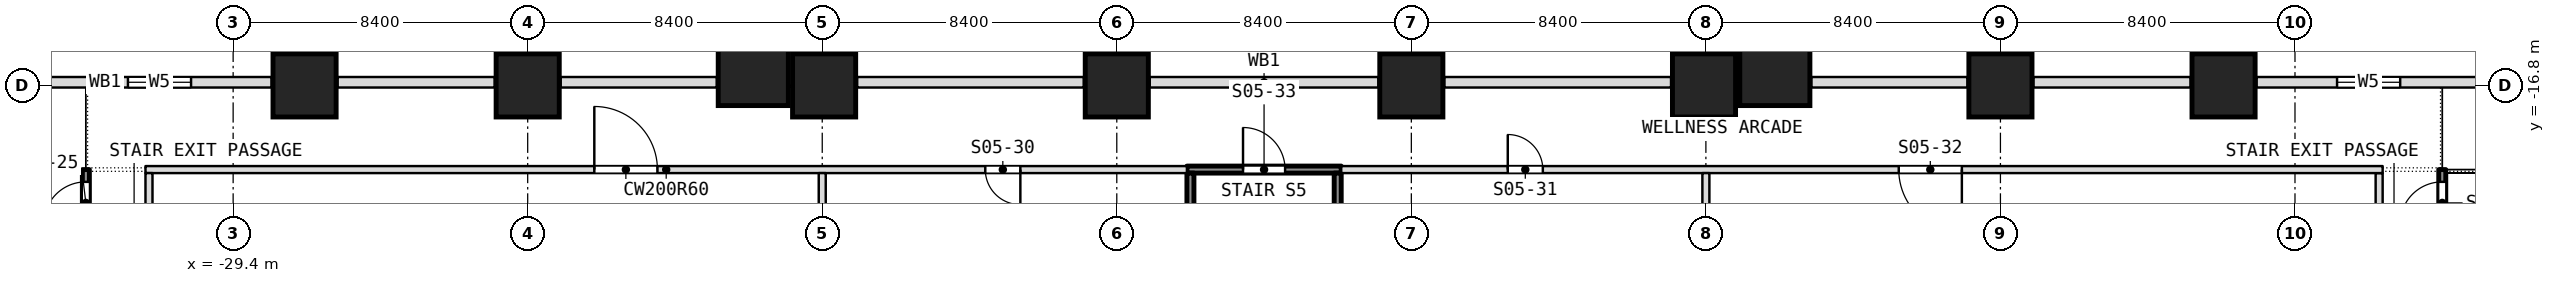
"""IFC4 building model, lengths in metres.
Left out: names, types, materials, properties, quantities, classifications, styles, units other than length and angle.
Written with IfcOpenShell. Run it as: python <this file> out.ifc"""

import sys

from ifc_helpers import new_model, si_unit, direction, frame, frame_2d, origin, origin_2d, place, context, subcontext, project, spatial, polyline, rectangle, outline, extrude, element, fill, save


model = new_model("IFC4")
c1 = context("Model", 3, precision=1e-05, world=origin(), true_north=direction((0.0, 1.0)))
c2 = subcontext(c1, "Body", "Model", "MODEL_VIEW")
j1 = project(units=[si_unit("LENGTHUNIT", "METRE"), si_unit("PLANEANGLEUNIT", "RADIAN")], contexts=[c1])
p1 = place(None, origin())
s1 = spatial("IfcSite", under=j1, at=p1, CompositionType="ELEMENT")
p2 = place(p1, origin())
s2 = spatial("IfcBuilding", under=s1, at=p2, CompositionType="ELEMENT")
p3 = place(p2, frame((0.0, 0.0, 26.0)))
s3 = spatial("IfcBuildingStorey", under=s2, at=p3, CompositionType="ELEMENT", Elevation=26.0)
for number, where, z_axis, x_axis in (
    (1, (-21.0, -16.8, 0.0), (0.0, 0.0, 1.0), (1.0, 0.0, 0.0)),
    (2, (-12.546, -16.8, 0.0), (0.0, 0.0, 1.0), (1.0, 0.0, 0.0)),
    (3, (-4.2, -16.8, 0.0), (0.0, 0.0, 1.0), (1.0, 0.0, 0.0)),
    (4, (4.2, -16.8, 0.0), (0.0, 0.0, 1.0), (1.0, 0.0, 0.0)),
    (5, (12.546, -16.8, 0.0), (0.0, 0.0, 1.0), (1.0, 0.0, 0.0)),
    (6, (21.0, -16.8, 0.0), (0.0, 0.0, 1.0), (1.0, 0.0, 0.0)),
    (7, (-27.363, -16.8, 0.0), (0.0, 0.0, 1.0), (1.0, 0.0, 0.0)),
    (8, (27.363, -16.8, 0.0), (0.0, 0.0, 1.0), (1.0, 0.0, 0.0)),
):
    element("IfcColumn", number, at=place(p3, frame(where, z_axis=z_axis, x_axis=x_axis)), inside=s3, PredefinedType="COLUMN", context=c2, shape_type="SweptSolid", body=[
        extrude(rectangle(XDim=1.8, YDim=1.8, at=origin_2d()), origin(), (0.0, 0.0, 1.0), 5.0),
    ])
for number, where, z_axis, x_axis in (
    (9, (-14.566, -16.375, 0.0), (0.0, 0.0, 1.0), (1.0, 0.0, 0.0)),
    (10, (14.566, -16.375, 0.0), (0.0, 0.0, 1.0), (1.0, 0.0, 0.0)),
):
    element("IfcColumn", number, at=place(p3, frame(where, z_axis=z_axis, x_axis=x_axis)), inside=s3, PredefinedType="COLUMN", context=c2, shape_type="SweptSolid", body=[
        extrude(rectangle(XDim=2.0, YDim=2.0, at=origin_2d()), origin(), (0.0, 0.0, 1.0), 5.0),
    ])
p4 = place(p3, frame((37.8, 2.4, 0.0), z_axis=(1.0, 0.0, 0.0), x_axis=(0.0, 0.0, 1.0)))
e11 = element("IfcWall", 11, at=p4, inside=s3, PredefinedType="SOLIDWALL", context=c2, shape_type="SweptSolid", body=[
    extrude(outline(polyline([(0.0, 0.0), (4.68, 0.0), (4.68, 21.6), (0.0, 21.6), (0.0, 16.321), (0.541, 15.6), (1.199, 14.4), (1.65, 13.2), (1.913, 12.0), (2.0, 10.8), (1.913, 9.6), (1.65, 8.4), (1.199, 7.2), (0.541, 6.0), (0.0, 5.279), (0.0, 0.0)])), origin(), (0.0, 0.0, -1.0), 4.2),
])
p5 = place(p3, frame((-37.8, 2.4, 0.0), z_axis=(-1.0, 0.0, 0.0), x_axis=(0.0, -1.0, 0.0)))
e12 = element("IfcWall", 12, at=p5, inside=s3, PredefinedType="SOLIDWALL", context=c2, shape_type="SweptSolid", body=[
    extrude(outline(polyline([(0.0, 0.0), (5.279, 0.0), (6.0, 0.541), (7.2, 1.199), (8.4, 1.65), (9.6, 1.913), (10.8, 2.0), (12.0, 1.913), (13.2, 1.65), (14.4, 1.199), (15.6, 0.541), (16.321, 0.0), (21.6, 0.0), (21.6, 4.68), (0.0, 4.68), (0.0, 0.0)])), origin(), (0.0, 0.0, -1.0), 4.2),
])
p6 = place(p3, frame((33.6, -22.3, 0.0), z_axis=(0.0, 0.0, 1.0), x_axis=(0.0, 1.0, 0.0)))
e13 = element("IfcWall", 13, at=p6, inside=s3, PredefinedType="PARTITIONING", context=c2, shape_type="SweptSolid", body=[
    extrude(rectangle(XDim=3.1, YDim=0.2, at=frame_2d((1.55, 0.0))), origin(), (0.0, 0.0, 1.0), 4.68),
])
p7 = place(p6, frame((1.55, 0.0, 0.0)))
e14 = element("IfcOpeningElement", 14, at=p7, cuts=e13, PredefinedType="OPENING", context=c2, shape_type="SweptSolid", body=[
    extrude(rectangle(XDim=1.2, YDim=2.1, at=frame_2d((0.6, 1.05))), frame((0.0, 0.1, 0.0), z_axis=(0.0, -1.0, 0.0), x_axis=(1.0, 0.0, 0.0)), (0.0, 0.0, 1.0), 0.2),
])
p8 = place(p3, frame((31.8, -22.1, 0.0), z_axis=(0.0, 0.0, 1.0), x_axis=(0.0, 1.0, 0.0)))
e15 = element("IfcWall", 15, at=p8, inside=s3, PredefinedType="PARTITIONING", context=c2, shape_type="SweptSolid", body=[
    extrude(rectangle(XDim=2.8, YDim=0.2, at=frame_2d((1.4, 0.0))), origin(), (0.0, 0.0, 1.0), 4.68),
])
p9 = place(p3, frame((-31.9, -19.2, 0.0), z_axis=(0.0, 0.0, 1.0), x_axis=(1.0, 0.0, 0.0)))
e16 = element("IfcWall", 16, at=p9, inside=s3, PredefinedType="PARTITIONING", context=c2, shape_type="SweptSolid", body=[
    extrude(rectangle(XDim=29.7, YDim=0.2, at=frame_2d((14.85, 0.0))), origin(), (0.0, 0.0, 1.0), 4.68),
])
p10 = place(p9, frame((12.8, 0.0, 0.0)))
e17 = element("IfcOpeningElement", 17, at=p10, cuts=e16, PredefinedType="OPENING", context=c2, shape_type="SweptSolid", body=[
    extrude(rectangle(XDim=1.8, YDim=2.1, at=frame_2d((0.9, 1.05))), frame((0.0, 0.1, 0.0), z_axis=(0.0, -1.0, 0.0), x_axis=(1.0, 0.0, 0.0)), (0.0, 0.0, 1.0), 0.2),
])
p11 = place(p9, frame((23.95, 0.0, 0.0)))
e18 = element("IfcOpeningElement", 18, at=p11, cuts=e16, PredefinedType="OPENING", context=c2, shape_type="SweptSolid", body=[
    extrude(rectangle(XDim=1.0, YDim=2.1, at=frame_2d((0.5, 1.05))), frame((0.0, 0.1, 0.0), z_axis=(0.0, -1.0, 0.0), x_axis=(1.0, 0.0, 0.0)), (0.0, 0.0, 1.0), 0.2),
])
p12 = place(p3, frame((2.2, -19.2, 0.0), z_axis=(0.0, 0.0, 1.0), x_axis=(1.0, 0.0, 0.0)))
e19 = element("IfcWall", 19, at=p12, inside=s3, PredefinedType="PARTITIONING", context=c2, shape_type="SweptSolid", body=[
    extrude(rectangle(XDim=29.7, YDim=0.2, at=frame_2d((14.85, 0.0))), origin(), (0.0, 0.0, 1.0), 4.68),
])
p13 = place(p12, frame((4.75, 0.0, 0.0)))
e20 = element("IfcOpeningElement", 20, at=p13, cuts=e19, PredefinedType="OPENING", context=c2, shape_type="SweptSolid", body=[
    extrude(rectangle(XDim=1.0, YDim=2.1, at=frame_2d((0.5, 1.05))), frame((0.0, 0.1, 0.0), z_axis=(0.0, -1.0, 0.0), x_axis=(1.0, 0.0, 0.0)), (0.0, 0.0, 1.0), 0.2),
])
p14 = place(p12, frame((15.9, 0.0, 0.0)))
e21 = element("IfcOpeningElement", 21, at=p14, cuts=e19, PredefinedType="OPENING", context=c2, shape_type="SweptSolid", body=[
    extrude(rectangle(XDim=1.8, YDim=2.1, at=frame_2d((0.9, 1.05))), frame((0.0, 0.1, 0.0), z_axis=(0.0, -1.0, 0.0), x_axis=(1.0, 0.0, 0.0)), (0.0, 0.0, 1.0), 0.2),
])
p15 = place(p3, frame((-2.2, -19.2, 0.0), z_axis=(0.0, 0.0, 1.0), x_axis=(1.0, 0.0, 0.0)))
e22 = element("IfcWall", 22, at=p15, inside=s3, PredefinedType="PARTITIONING", context=c2, shape_type="SweptSolid", body=[
    extrude(rectangle(XDim=4.4, YDim=0.2, at=frame_2d((2.2, 0.0))), origin(), (0.0, 0.0, 1.0), 4.68),
])
p16 = place(p15, frame((1.6, 0.0, 0.0)))
e23 = element("IfcOpeningElement", 23, at=p16, cuts=e22, PredefinedType="OPENING", context=c2, shape_type="SweptSolid", body=[
    extrude(rectangle(XDim=1.2, YDim=2.1, at=frame_2d((0.6, 1.05))), frame((0.0, 0.1, 0.0), z_axis=(0.0, -1.0, 0.0), x_axis=(1.0, 0.0, 0.0)), (0.0, 0.0, 1.0), 0.2),
])
p17 = place(p3, frame((12.6, -25.5, 0.0), z_axis=(0.0, 0.0, 1.0), x_axis=(0.0, 1.0, 0.0)))
e24 = element("IfcWall", 24, at=p17, inside=s3, PredefinedType="PARTITIONING", context=c2, shape_type="SweptSolid", body=[
    extrude(rectangle(XDim=6.2, YDim=0.2, at=frame_2d((3.1, 0.0))), origin(), (0.0, 0.0, 1.0), 4.68),
])
for number, where, z_axis, x_axis in (
    (25, (2.1, -25.14, 0.0), (0.0, 0.0, 1.0), (0.0, 1.0, 0.0)),
    (26, (-2.1, -25.14, 0.0), (0.0, 0.0, 1.0), (0.0, 1.0, 0.0)),
):
    element("IfcWall", number, at=place(p3, frame(where, z_axis=z_axis, x_axis=x_axis)), inside=s3, PredefinedType="PARTITIONING", context=c2, shape_type="SweptSolid", body=[
        extrude(rectangle(XDim=5.84, YDim=0.2, at=frame_2d((2.92, 0.0))), origin(), (0.0, 0.0, 1.0), 4.68),
    ])
p18 = place(p3, frame((-12.6, -25.5, 0.0), z_axis=(0.0, 0.0, 1.0), x_axis=(0.0, 1.0, 0.0)))
e27 = element("IfcWall", 27, at=p18, inside=s3, PredefinedType="PARTITIONING", context=c2, shape_type="SweptSolid", body=[
    extrude(rectangle(XDim=6.2, YDim=0.2, at=frame_2d((3.1, 0.0))), origin(), (0.0, 0.0, 1.0), 4.68),
])
p19 = place(p3, frame((-31.8, -22.1, 0.0), z_axis=(0.0, 0.0, 1.0), x_axis=(0.0, 1.0, 0.0)))
e28 = element("IfcWall", 28, at=p19, inside=s3, PredefinedType="PARTITIONING", context=c2, shape_type="SweptSolid", body=[
    extrude(rectangle(XDim=2.8, YDim=0.2, at=frame_2d((1.4, 0.0))), origin(), (0.0, 0.0, 1.0), 4.68),
])
p20 = place(p3, frame((-33.6, -22.3, 0.0), z_axis=(0.0, 0.0, 1.0), x_axis=(0.0, 1.0, 0.0)))
e29 = element("IfcWall", 29, at=p20, inside=s3, PredefinedType="PARTITIONING", context=c2, shape_type="SweptSolid", body=[
    extrude(rectangle(XDim=3.1, YDim=0.2, at=frame_2d((1.55, 0.0))), origin(), (0.0, 0.0, 1.0), 4.68),
])
p21 = place(p20, frame((1.55, 0.0, 0.0)))
e30 = element("IfcOpeningElement", 30, at=p21, cuts=e29, PredefinedType="OPENING", context=c2, shape_type="SweptSolid", body=[
    extrude(rectangle(XDim=1.2, YDim=2.1, at=frame_2d((0.6, 1.05))), frame((0.0, 0.1, 0.0), z_axis=(0.0, -1.0, 0.0), x_axis=(1.0, 0.0, 0.0)), (0.0, 0.0, 1.0), 0.2),
])
p22 = place(p3, frame((37.8, -16.71, 0.0), z_axis=(0.0, 0.0, 1.0), x_axis=(-1.0, 0.0, 0.0)))
e31 = element("IfcWall", 31, at=p22, inside=s3, PredefinedType="NOTDEFINED", context=c2, shape_type="SweptSolid", body=[
    extrude(rectangle(XDim=9.497, YDim=0.3, at=frame_2d((4.749, 0.0))), origin(), (0.0, 0.0, 1.0), 5.0),
])
p23 = place(p22, frame((5.4, 0.0, 1.2)))
e32 = element("IfcOpeningElement", 32, at=p23, cuts=e31, PredefinedType="OPENING", context=c2, shape_type="SweptSolid", body=[
    extrude(rectangle(XDim=1.8, YDim=2.4, at=frame_2d((0.9, 1.2))), frame((0.0, 0.15, 0.0), z_axis=(0.0, -1.0, 0.0), x_axis=(1.0, 0.0, 0.0)), (0.0, 0.0, 1.0), 0.3),
])
p24 = place(p3, frame((26.423, -16.71, 0.0), z_axis=(0.0, 0.0, 1.0), x_axis=(-1.0, 0.0, 0.0)))
e33 = element("IfcWall", 33, at=p24, inside=s3, PredefinedType="NOTDEFINED", context=c2, shape_type="SweptSolid", body=[
    extrude(rectangle(XDim=4.483, YDim=0.3, at=frame_2d((2.242, 0.0))), origin(), (0.0, 0.0, 1.0), 5.0),
])
p25 = place(p3, frame((20.06, -16.71, 0.0), z_axis=(0.0, 0.0, 1.0), x_axis=(-1.0, 0.0, 0.0)))
e34 = element("IfcWall", 34, at=p25, inside=s3, PredefinedType="NOTDEFINED", context=c2, shape_type="SweptSolid", body=[
    extrude(rectangle(XDim=4.454, YDim=0.3, at=frame_2d((2.227, 0.0))), origin(), (0.0, 0.0, 1.0), 5.0),
])
p26 = place(p3, frame((11.606, -16.71, 0.0), z_axis=(0.0, 0.0, 1.0), x_axis=(-1.0, 0.0, 0.0)))
e35 = element("IfcWall", 35, at=p26, inside=s3, PredefinedType="NOTDEFINED", context=c2, shape_type="SweptSolid", body=[
    extrude(rectangle(XDim=6.466, YDim=0.3, at=frame_2d((3.233, 0.0))), origin(), (0.0, 0.0, 1.0), 5.0),
])
p27 = place(p3, frame((3.26, -16.71, 0.0), z_axis=(0.0, 0.0, 1.0), x_axis=(-1.0, 0.0, 0.0)))
e36 = element("IfcWall", 36, at=p27, inside=s3, PredefinedType="NOTDEFINED", context=c2, shape_type="SweptSolid", body=[
    extrude(rectangle(XDim=6.52, YDim=0.3, at=frame_2d((3.26, 0.0))), origin(), (0.0, 0.0, 1.0), 5.0),
])
p28 = place(p3, frame((-5.14, -16.71, 0.0), z_axis=(0.0, 0.0, 1.0), x_axis=(-1.0, 0.0, 0.0)))
e37 = element("IfcWall", 37, at=p28, inside=s3, PredefinedType="NOTDEFINED", context=c2, shape_type="SweptSolid", body=[
    extrude(rectangle(XDim=6.466, YDim=0.3, at=frame_2d((3.233, 0.0))), origin(), (0.0, 0.0, 1.0), 5.0),
])
p29 = place(p3, frame((-15.606, -16.71, 0.0), z_axis=(0.0, 0.0, 1.0), x_axis=(-1.0, 0.0, 0.0)))
e38 = element("IfcWall", 38, at=p29, inside=s3, PredefinedType="NOTDEFINED", context=c2, shape_type="SweptSolid", body=[
    extrude(rectangle(XDim=4.454, YDim=0.3, at=frame_2d((2.227, 0.0))), origin(), (0.0, 0.0, 1.0), 5.0),
])
p30 = place(p3, frame((-21.94, -16.71, 0.0), z_axis=(0.0, 0.0, 1.0), x_axis=(-1.0, 0.0, 0.0)))
e39 = element("IfcWall", 39, at=p30, inside=s3, PredefinedType="NOTDEFINED", context=c2, shape_type="SweptSolid", body=[
    extrude(rectangle(XDim=4.483, YDim=0.3, at=frame_2d((2.242, 0.0))), origin(), (0.0, 0.0, 1.0), 5.0),
])
p31 = place(p3, frame((-28.303, -16.71, 0.0), z_axis=(0.0, 0.0, 1.0), x_axis=(-1.0, 0.0, 0.0)))
e40 = element("IfcWall", 40, at=p31, inside=s3, PredefinedType="NOTDEFINED", context=c2, shape_type="SweptSolid", body=[
    extrude(rectangle(XDim=9.497, YDim=0.3, at=frame_2d((4.749, 0.0))), origin(), (0.0, 0.0, 1.0), 5.0),
])
p32 = place(p31, frame((2.297, 0.0, 1.2)))
e41 = element("IfcOpeningElement", 41, at=p32, cuts=e40, PredefinedType="OPENING", context=c2, shape_type="SweptSolid", body=[
    extrude(rectangle(XDim=1.8, YDim=2.4, at=frame_2d((0.9, 1.2))), frame((0.0, 0.15, 0.0), z_axis=(0.0, -1.0, 0.0), x_axis=(1.0, 0.0, 0.0)), (0.0, 0.0, 1.0), 0.3),
])
p33 = place(p21, origin())
e42 = element("IfcDoor", 42, at=p33, inside=s3, OperationType="SINGLE_SWING_RIGHT", PredefinedType="DOOR", context=c2, shape_type="SweptSolid", body=[
    extrude(rectangle(XDim=1.2, YDim=2.1, at=frame_2d((0.6, 1.05))), frame((0.0, 0.025, 0.0), z_axis=(0.0, -1.0, 0.0), x_axis=(1.0, 0.0, 0.0)), (0.0, 0.0, 1.0), 0.05),
])
fill(e30, e42)
p34 = place(p7, origin())
e43 = element("IfcDoor", 43, at=p34, inside=s3, OperationType="SINGLE_SWING_LEFT", PredefinedType="DOOR", context=c2, shape_type="SweptSolid", body=[
    extrude(rectangle(XDim=1.2, YDim=2.1, at=frame_2d((0.6, 1.05))), frame((0.0, 0.025, 0.0), z_axis=(0.0, -1.0, 0.0), x_axis=(1.0, 0.0, 0.0)), (0.0, 0.0, 1.0), 0.05),
])
fill(e14, e43)
p35 = place(p10, origin())
e44 = element("IfcDoor", 44, at=p35, inside=s3, OperationType="DOUBLE_DOOR_SINGLE_SWING", PredefinedType="DOOR", context=c2, shape_type="SweptSolid", body=[
    extrude(rectangle(XDim=1.8, YDim=2.1, at=frame_2d((0.9, 1.05))), frame((0.0, 0.025, 0.0), z_axis=(0.0, -1.0, 0.0), x_axis=(1.0, 0.0, 0.0)), (0.0, 0.0, 1.0), 0.05),
])
fill(e17, e44)
p36 = place(p11, origin())
e45 = element("IfcDoor", 45, at=p36, inside=s3, OperationType="SINGLE_SWING_RIGHT", PredefinedType="DOOR", context=c2, shape_type="SweptSolid", body=[
    extrude(rectangle(XDim=1.0, YDim=2.1, at=frame_2d((0.5, 1.05))), frame((0.0, 0.025, 0.0), z_axis=(0.0, -1.0, 0.0), x_axis=(1.0, 0.0, 0.0)), (0.0, 0.0, 1.0), 0.05),
])
fill(e18, e45)
p37 = place(p13, origin())
e46 = element("IfcDoor", 46, at=p37, inside=s3, OperationType="SINGLE_SWING_LEFT", PredefinedType="DOOR", context=c2, shape_type="SweptSolid", body=[
    extrude(rectangle(XDim=1.0, YDim=2.1, at=frame_2d((0.5, 1.05))), frame((0.0, 0.025, 0.0), z_axis=(0.0, -1.0, 0.0), x_axis=(1.0, 0.0, 0.0)), (0.0, 0.0, 1.0), 0.05),
])
fill(e20, e46)
p38 = place(p14, origin())
e47 = element("IfcDoor", 47, at=p38, inside=s3, OperationType="DOUBLE_DOOR_SINGLE_SWING", PredefinedType="DOOR", context=c2, shape_type="SweptSolid", body=[
    extrude(rectangle(XDim=1.8, YDim=2.1, at=frame_2d((0.9, 1.05))), frame((0.0, 0.025, 0.0), z_axis=(0.0, -1.0, 0.0), x_axis=(1.0, 0.0, 0.0)), (0.0, 0.0, 1.0), 0.05),
])
fill(e21, e47)
p39 = place(p16, origin())
e48 = element("IfcDoor", 48, at=p39, inside=s3, OperationType="SINGLE_SWING_LEFT", PredefinedType="DOOR", context=c2, shape_type="SweptSolid", body=[
    extrude(rectangle(XDim=1.2, YDim=2.1, at=frame_2d((0.6, 1.05))), frame((0.0, 0.025, 0.0), z_axis=(0.0, -1.0, 0.0), x_axis=(1.0, 0.0, 0.0)), (0.0, 0.0, 1.0), 0.05),
])
fill(e23, e48)
p40 = place(p23, origin())
e49 = element("IfcWindow", 49, at=p40, inside=s3, PartitioningType="SINGLE_PANEL", PredefinedType="WINDOW", context=c2, shape_type="SweptSolid", body=[
    extrude(rectangle(XDim=1.8, YDim=2.4, at=frame_2d((0.9, 1.2))), frame((0.0, 0.03, 0.0), z_axis=(0.0, -1.0, 0.0), x_axis=(1.0, 0.0, 0.0)), (0.0, 0.0, 1.0), 0.06),
])
fill(e32, e49)
p41 = place(p32, origin())
e50 = element("IfcWindow", 50, at=p41, inside=s3, PartitioningType="SINGLE_PANEL", PredefinedType="WINDOW", context=c2, shape_type="SweptSolid", body=[
    extrude(rectangle(XDim=1.8, YDim=2.4, at=frame_2d((0.9, 1.2))), frame((0.0, 0.03, 0.0), z_axis=(0.0, -1.0, 0.0), x_axis=(1.0, 0.0, 0.0)), (0.0, 0.0, 1.0), 0.06),
])
fill(e41, e50)
save(model, sys.argv[1])
